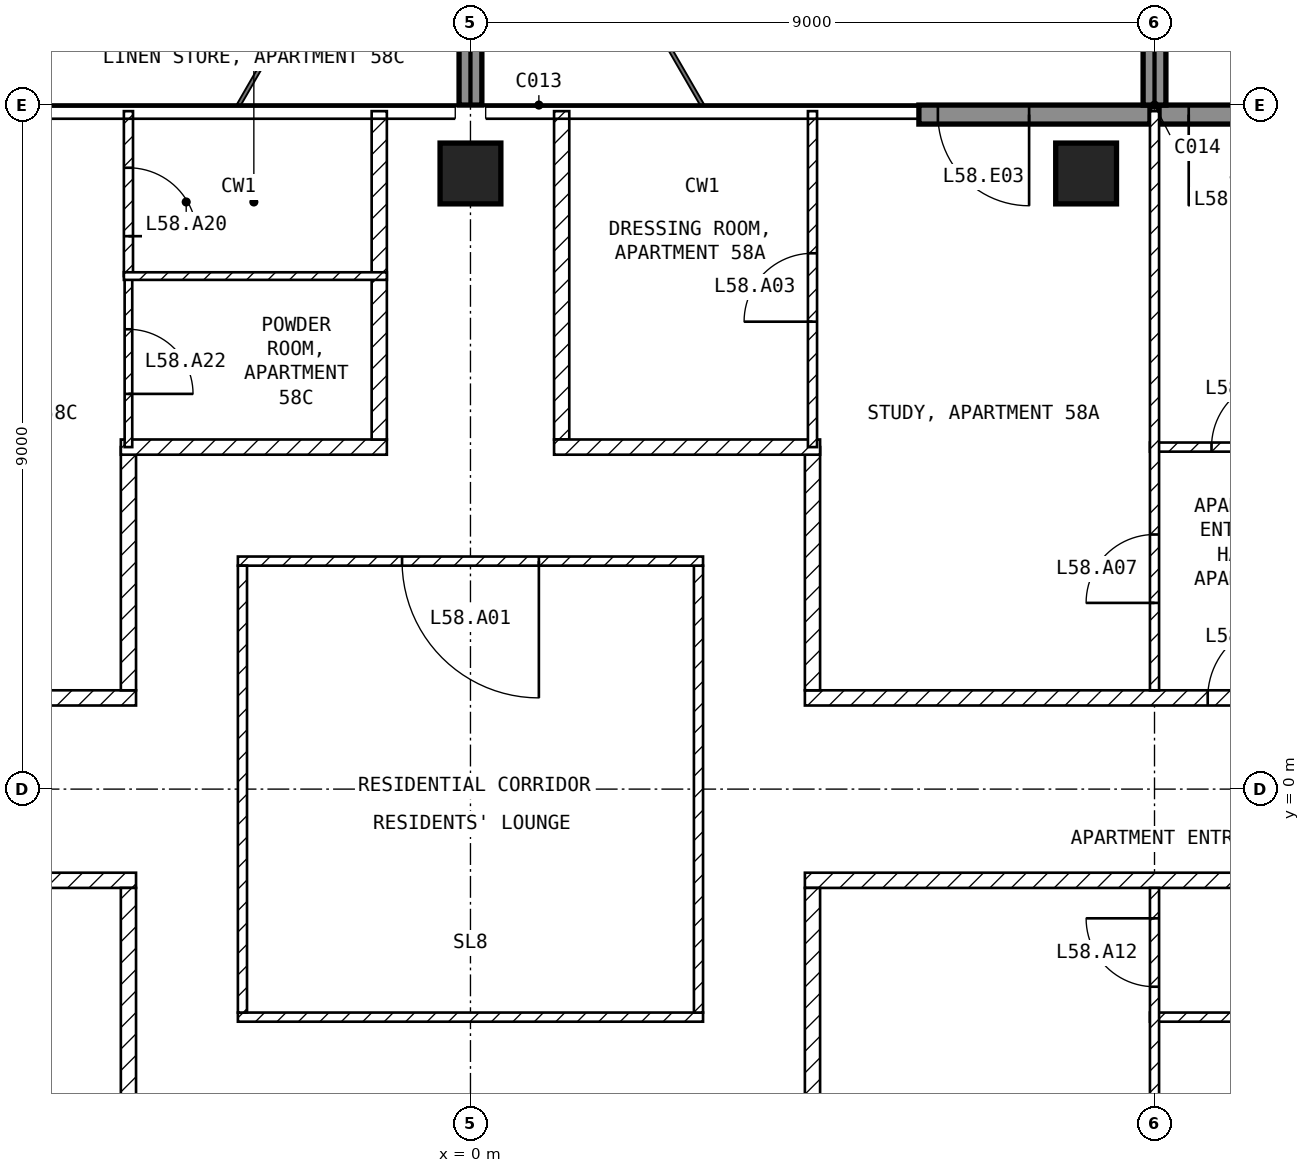
"""IFC4 building model, lengths in metres.
Left out: names, types, materials, properties, quantities, classifications, styles, units other than length and angle.
Written with IfcOpenShell. Run it as: python <this file> out.ifc"""

import sys

from ifc_helpers import new_model, si_unit, direction, frame, frame_2d, origin, origin_2d, place, context, subcontext, project, spatial, rectangle, extrude, element, fill, save


model = new_model("IFC4")
c1 = context("Model", 3, precision=1e-05, world=origin(), true_north=direction((0.0, 1.0)))
c2 = subcontext(c1, "Body", "Model", "MODEL_VIEW")
j1 = project(units=[si_unit("LENGTHUNIT", "METRE"), si_unit("PLANEANGLEUNIT", "RADIAN")], contexts=[c1])
p1 = place(None, origin())
s1 = spatial("IfcSite", under=j1, at=p1, CompositionType="ELEMENT")
p2 = place(p1, origin())
s2 = spatial("IfcBuilding", under=s1, at=p2, CompositionType="ELEMENT")
p3 = place(p2, frame((0.0, 0.0, 232.5)))
s3 = spatial("IfcBuildingStorey", under=s2, at=p3, CompositionType="ELEMENT", Elevation=232.5)
for number, where, z_axis, x_axis in (
    (1, (0.0, 8.1, -0.25), (0.0, 0.0, 1.0), (1.0, 0.0, 0.0)),
    (2, (8.1, 8.1, -0.25), (0.0, 0.0, 1.0), (1.0, 0.0, 0.0)),
):
    element("IfcColumn", number, at=place(p3, frame(where, z_axis=z_axis, x_axis=x_axis)), inside=s3, PredefinedType="COLUMN", context=c2, shape_type="SweptSolid", body=[
        extrude(rectangle(XDim=0.8, YDim=0.8, at=origin_2d()), origin(), (0.0, 0.0, 1.0), 3.5),
    ])
p4 = place(p3, frame((10.9, 8.875, 0.0), z_axis=(0.0, 0.0, 1.0), x_axis=(-1.0, 0.0, 0.0)))
e3 = element("IfcWall", 3, at=p4, inside=s3, PredefinedType="SOLIDWALL", context=c2, shape_type="SweptSolid", body=[
    extrude(rectangle(XDim=1.84, YDim=0.25, at=frame_2d((0.92, 0.0))), origin(), (0.0, 0.0, 1.0), 3.25),
])
p5 = place(p4, frame((0.25, 0.0, 0.0)))
e4 = element("IfcOpeningElement", 4, at=p5, cuts=e3, PredefinedType="OPENING", context=c2, shape_type="SweptSolid", body=[
    extrude(rectangle(XDim=1.2, YDim=2.4, at=frame_2d((0.6, 1.2))), frame((0.0, 0.135, 0.0), z_axis=(0.0, -1.0, 0.0), x_axis=(1.0, 0.0, 0.0)), (0.0, 0.0, 1.0), 0.27),
])
p6 = place(p3, frame((8.94, 8.875, 0.0), z_axis=(0.0, 0.0, 1.0), x_axis=(-1.0, 0.0, 0.0)))
e5 = element("IfcWall", 5, at=p6, inside=s3, PredefinedType="SOLIDWALL", context=c2, shape_type="SweptSolid", body=[
    extrude(rectangle(XDim=3.04, YDim=0.25, at=frame_2d((1.52, 0.0))), origin(), (0.0, 0.0, 1.0), 3.25),
])
p7 = place(p6, frame((1.59, 0.0, 0.0)))
e6 = element("IfcOpeningElement", 6, at=p7, cuts=e5, PredefinedType="OPENING", context=c2, shape_type="SweptSolid", body=[
    extrude(rectangle(XDim=1.2, YDim=2.4, at=frame_2d((0.6, 1.2))), frame((0.0, 0.135, 0.0), z_axis=(0.0, -1.0, 0.0), x_axis=(1.0, 0.0, 0.0)), (0.0, 0.0, 1.0), 0.27),
])
for number, where, z_axis, x_axis in (
    (7, (0.0, 9.0, 0.0), (0.0, 0.0, 1.0), (0.0, 1.0, 0.0)),
    (8, (9.0, 9.0, 0.0), (0.0, 0.0, 1.0), (0.0, 1.0, 0.0)),
):
    element("IfcWall", number, at=place(p3, frame(where, z_axis=z_axis, x_axis=x_axis)), inside=s3, PredefinedType="SOLIDWALL", context=c2, shape_type="SweptSolid", body=[
        extrude(rectangle(XDim=2.7, YDim=0.3, at=frame_2d((1.35, 0.0))), origin(), (0.0, 0.0, 1.0), 3.25),
    ])
p8 = place(p3, frame((-3.06, -3.0, 0.0), z_axis=(0.0, 0.0, 1.0), x_axis=(1.0, 0.0, 0.0)))
e9 = element("IfcWall", 9, at=p8, inside=s3, PredefinedType="PARTITIONING", context=c2, shape_type="SweptSolid", body=[
    extrude(rectangle(XDim=6.12, YDim=0.12, at=frame_2d((3.06, 0.0))), origin(), (0.0, 0.0, 1.0), 3.25),
])
p9 = place(p3, frame((3.0, -2.94, 0.0), z_axis=(0.0, 0.0, 1.0), x_axis=(0.0, 1.0, 0.0)))
e10 = element("IfcWall", 10, at=p9, inside=s3, PredefinedType="PARTITIONING", context=c2, shape_type="SweptSolid", body=[
    extrude(rectangle(XDim=5.88, YDim=0.12, at=frame_2d((2.94, 0.0))), origin(), (0.0, 0.0, 1.0), 3.25),
])
p10 = place(p3, frame((3.06, 3.0, 0.0), z_axis=(0.0, 0.0, 1.0), x_axis=(-1.0, 0.0, 0.0)))
e11 = element("IfcWall", 11, at=p10, inside=s3, PredefinedType="PARTITIONING", context=c2, shape_type="SweptSolid", body=[
    extrude(rectangle(XDim=6.12, YDim=0.12, at=frame_2d((3.06, 0.0))), origin(), (0.0, 0.0, 1.0), 3.25),
])
p11 = place(p10, frame((2.16, 0.0, 0.0)))
e12 = element("IfcOpeningElement", 12, at=p11, cuts=e11, PredefinedType="OPENING", context=c2, shape_type="SweptSolid", body=[
    extrude(rectangle(XDim=1.8, YDim=2.1, at=frame_2d((0.9, 1.05))), frame((0.0, 0.07, 0.0), z_axis=(0.0, -1.0, 0.0), x_axis=(1.0, 0.0, 0.0)), (0.0, 0.0, 1.0), 0.14),
])
p12 = place(p3, frame((-3.0, 2.94, 0.0), z_axis=(0.0, 0.0, 1.0), x_axis=(0.0, -1.0, 0.0)))
e13 = element("IfcWall", 13, at=p12, inside=s3, PredefinedType="PARTITIONING", context=c2, shape_type="SweptSolid", body=[
    extrude(rectangle(XDim=5.88, YDim=0.12, at=frame_2d((2.94, 0.0))), origin(), (0.0, 0.0, 1.0), 3.25),
])
p13 = place(p3, frame((4.4, 1.2, 0.0), z_axis=(0.0, 0.0, 1.0), x_axis=(1.0, 0.0, 0.0)))
e14 = element("IfcWall", 14, at=p13, inside=s3, PredefinedType="PARTITIONING", context=c2, shape_type="SweptSolid", body=[
    extrude(rectangle(XDim=17.2, YDim=0.2, at=frame_2d((8.6, 0.0))), origin(), (0.0, 0.0, 1.0), 3.25),
])
p14 = place(p13, frame((5.3, 0.0, 0.0)))
e15 = element("IfcOpeningElement", 15, at=p14, cuts=e14, PredefinedType="OPENING", context=c2, shape_type="SweptSolid", body=[
    extrude(rectangle(XDim=1.0, YDim=2.1, at=frame_2d((0.5, 1.05))), frame((0.0, 0.11, 0.0), z_axis=(0.0, -1.0, 0.0), x_axis=(1.0, 0.0, 0.0)), (0.0, 0.0, 1.0), 0.22),
])
p15 = place(p3, frame((4.5, 4.5, 0.0), z_axis=(0.0, 0.0, 1.0), x_axis=(0.0, -1.0, 0.0)))
e16 = element("IfcWall", 16, at=p15, inside=s3, PredefinedType="PARTITIONING", context=c2, shape_type="SweptSolid", body=[
    extrude(rectangle(XDim=3.2, YDim=0.2, at=frame_2d((1.6, 0.0))), origin(), (0.0, 0.0, 1.0), 3.25),
])
p16 = place(p3, frame((1.2, 8.92, 0.0), z_axis=(0.0, 0.0, 1.0), x_axis=(0.0, -1.0, 0.0)))
e17 = element("IfcWall", 17, at=p16, inside=s3, PredefinedType="PARTITIONING", context=c2, shape_type="SweptSolid", body=[
    extrude(rectangle(XDim=4.32, YDim=0.2, at=frame_2d((2.16, 0.0))), origin(), (0.0, 0.0, 1.0), 3.25),
])
p17 = place(p3, frame((1.1, 4.5, 0.0), z_axis=(0.0, 0.0, 1.0), x_axis=(1.0, 0.0, 0.0)))
e18 = element("IfcWall", 18, at=p17, inside=s3, PredefinedType="PARTITIONING", context=c2, shape_type="SweptSolid", body=[
    extrude(rectangle(XDim=3.5, YDim=0.2, at=frame_2d((1.75, 0.0))), origin(), (0.0, 0.0, 1.0), 3.25),
])
p18 = place(p3, frame((21.6, -1.2, 0.0), z_axis=(0.0, 0.0, 1.0), x_axis=(-1.0, 0.0, 0.0)))
e19 = element("IfcWall", 19, at=p18, inside=s3, PredefinedType="PARTITIONING", context=c2, shape_type="SweptSolid", body=[
    extrude(rectangle(XDim=17.2, YDim=0.2, at=frame_2d((8.6, 0.0))), origin(), (0.0, 0.0, 1.0), 3.25),
])
p19 = place(p18, frame((10.3, 0.0, 0.0)))
e20 = element("IfcOpeningElement", 20, at=p19, cuts=e19, PredefinedType="OPENING", context=c2, shape_type="SweptSolid", body=[
    extrude(rectangle(XDim=1.0, YDim=2.1, at=frame_2d((0.5, 1.05))), frame((0.0, 0.11, 0.0), z_axis=(0.0, -1.0, 0.0), x_axis=(1.0, 0.0, 0.0)), (0.0, 0.0, 1.0), 0.22),
])
p20 = place(p3, frame((4.5, -1.3, 0.0), z_axis=(0.0, 0.0, 1.0), x_axis=(0.0, -1.0, 0.0)))
e21 = element("IfcWall", 21, at=p20, inside=s3, PredefinedType="PARTITIONING", context=c2, shape_type="SweptSolid", body=[
    extrude(rectangle(XDim=3.2, YDim=0.2, at=frame_2d((1.6, 0.0))), origin(), (0.0, 0.0, 1.0), 3.25),
])
p21 = place(p3, frame((-21.6, 1.2, 0.0), z_axis=(0.0, 0.0, 1.0), x_axis=(1.0, 0.0, 0.0)))
e22 = element("IfcWall", 22, at=p21, inside=s3, PredefinedType="PARTITIONING", context=c2, shape_type="SweptSolid", body=[
    extrude(rectangle(XDim=17.2, YDim=0.2, at=frame_2d((8.6, 0.0))), origin(), (0.0, 0.0, 1.0), 3.25),
])
p22 = place(p21, frame((6.1, 0.0, 0.0)))
e23 = element("IfcOpeningElement", 23, at=p22, cuts=e22, PredefinedType="OPENING", context=c2, shape_type="SweptSolid", body=[
    extrude(rectangle(XDim=1.0, YDim=2.1, at=frame_2d((0.5, 1.05))), frame((0.0, 0.11, 0.0), z_axis=(0.0, -1.0, 0.0), x_axis=(1.0, 0.0, 0.0)), (0.0, 0.0, 1.0), 0.22),
])
p23 = place(p3, frame((-4.5, 1.3, 0.0), z_axis=(0.0, 0.0, 1.0), x_axis=(0.0, 1.0, 0.0)))
e24 = element("IfcWall", 24, at=p23, inside=s3, PredefinedType="PARTITIONING", context=c2, shape_type="SweptSolid", body=[
    extrude(rectangle(XDim=3.2, YDim=0.2, at=frame_2d((1.6, 0.0))), origin(), (0.0, 0.0, 1.0), 3.25),
])
p24 = place(p3, frame((-4.6, 4.5, 0.0), z_axis=(0.0, 0.0, 1.0), x_axis=(1.0, 0.0, 0.0)))
e25 = element("IfcWall", 25, at=p24, inside=s3, PredefinedType="PARTITIONING", context=c2, shape_type="SweptSolid", body=[
    extrude(rectangle(XDim=3.5, YDim=0.2, at=frame_2d((1.75, 0.0))), origin(), (0.0, 0.0, 1.0), 3.25),
])
p25 = place(p3, frame((-1.2, 4.6, 0.0), z_axis=(0.0, 0.0, 1.0), x_axis=(0.0, 1.0, 0.0)))
e26 = element("IfcWall", 26, at=p25, inside=s3, PredefinedType="PARTITIONING", context=c2, shape_type="SweptSolid", body=[
    extrude(rectangle(XDim=4.32, YDim=0.2, at=frame_2d((2.16, 0.0))), origin(), (0.0, 0.0, 1.0), 3.25),
])
p26 = place(p3, frame((-4.4, -1.2, 0.0), z_axis=(0.0, 0.0, 1.0), x_axis=(-1.0, 0.0, 0.0)))
e27 = element("IfcWall", 27, at=p26, inside=s3, PredefinedType="PARTITIONING", context=c2, shape_type="SweptSolid", body=[
    extrude(rectangle(XDim=17.2, YDim=0.2, at=frame_2d((8.6, 0.0))), origin(), (0.0, 0.0, 1.0), 3.25),
])
p27 = place(p26, frame((5.9, 0.0, 0.0)))
e28 = element("IfcOpeningElement", 28, at=p27, cuts=e27, PredefinedType="OPENING", context=c2, shape_type="SweptSolid", body=[
    extrude(rectangle(XDim=1.0, YDim=2.1, at=frame_2d((0.5, 1.05))), frame((0.0, 0.11, 0.0), z_axis=(0.0, -1.0, 0.0), x_axis=(1.0, 0.0, 0.0)), (0.0, 0.0, 1.0), 0.22),
])
p28 = place(p3, frame((-4.5, -4.5, 0.0), z_axis=(0.0, 0.0, 1.0), x_axis=(0.0, 1.0, 0.0)))
e29 = element("IfcWall", 29, at=p28, inside=s3, PredefinedType="PARTITIONING", context=c2, shape_type="SweptSolid", body=[
    extrude(rectangle(XDim=3.2, YDim=0.2, at=frame_2d((1.6, 0.0))), origin(), (0.0, 0.0, 1.0), 3.25),
])
p29 = place(p3, frame((8.94, 4.5, 0.0), z_axis=(0.0, 0.0, 1.0), x_axis=(1.0, 0.0, 0.0)))
e30 = element("IfcWall", 30, at=p29, inside=s3, PredefinedType="PARTITIONING", context=c2, shape_type="SweptSolid", body=[
    extrude(rectangle(XDim=5.46, YDim=0.12, at=frame_2d((2.73, 0.0))), origin(), (0.0, 0.0, 1.0), 3.25),
])
p30 = place(p29, frame((0.81, 0.0, 0.0)))
e31 = element("IfcOpeningElement", 31, at=p30, cuts=e30, PredefinedType="OPENING", context=c2, shape_type="SweptSolid", body=[
    extrude(rectangle(XDim=0.9, YDim=2.1, at=frame_2d((0.45, 1.05))), frame((0.0, 0.07, 0.0), z_axis=(0.0, -1.0, 0.0), x_axis=(1.0, 0.0, 0.0)), (0.0, 0.0, 1.0), 0.14),
])
p31 = place(p3, frame((9.0, 1.3, 0.0), z_axis=(0.0, 0.0, 1.0), x_axis=(0.0, 1.0, 0.0)))
e32 = element("IfcWall", 32, at=p31, inside=s3, PredefinedType="PARTITIONING", context=c2, shape_type="SweptSolid", body=[
    extrude(rectangle(XDim=7.62, YDim=0.12, at=frame_2d((3.81, 0.0))), origin(), (0.0, 0.0, 1.0), 3.25),
])
p32 = place(p31, frame((1.15, 0.0, 0.0)))
e33 = element("IfcOpeningElement", 33, at=p32, cuts=e32, PredefinedType="OPENING", context=c2, shape_type="SweptSolid", body=[
    extrude(rectangle(XDim=0.9, YDim=2.1, at=frame_2d((0.45, 1.05))), frame((0.0, 0.07, 0.0), z_axis=(0.0, -1.0, 0.0), x_axis=(1.0, 0.0, 0.0)), (0.0, 0.0, 1.0), 0.14),
])
p33 = place(p3, frame((4.5, 4.5, 0.0), z_axis=(0.0, 0.0, 1.0), x_axis=(0.0, 1.0, 0.0)))
e34 = element("IfcWall", 34, at=p33, inside=s3, PredefinedType="PARTITIONING", context=c2, shape_type="SweptSolid", body=[
    extrude(rectangle(XDim=4.42, YDim=0.12, at=frame_2d((2.21, 0.0))), origin(), (0.0, 0.0, 1.0), 3.25),
])
p34 = place(p33, frame((1.65, 0.0, 0.0)))
e35 = element("IfcOpeningElement", 35, at=p34, cuts=e34, PredefinedType="OPENING", context=c2, shape_type="SweptSolid", body=[
    extrude(rectangle(XDim=0.9, YDim=2.1, at=frame_2d((0.45, 1.05))), frame((0.0, 0.07, 0.0), z_axis=(0.0, -1.0, 0.0), x_axis=(1.0, 0.0, 0.0)), (0.0, 0.0, 1.0), 0.14),
])
p35 = place(p3, frame((17.4, -3.0, 0.0), z_axis=(0.0, 0.0, 1.0), x_axis=(-1.0, 0.0, 0.0)))
e36 = element("IfcWall", 36, at=p35, inside=s3, PredefinedType="PARTITIONING", context=c2, shape_type="SweptSolid", body=[
    extrude(rectangle(XDim=8.46, YDim=0.12, at=frame_2d((4.23, 0.0))), origin(), (0.0, 0.0, 1.0), 3.25),
])
p36 = place(p35, frame((0.45, 0.0, 0.0)))
e37 = element("IfcOpeningElement", 37, at=p36, cuts=e36, PredefinedType="OPENING", context=c2, shape_type="SweptSolid", body=[
    extrude(rectangle(XDim=0.9, YDim=2.1, at=frame_2d((0.45, 1.05))), frame((0.0, 0.07, 0.0), z_axis=(0.0, -1.0, 0.0), x_axis=(1.0, 0.0, 0.0)), (0.0, 0.0, 1.0), 0.14),
])
p37 = place(p35, frame((6.15, 0.0, 0.0)))
e38 = element("IfcOpeningElement", 38, at=p37, cuts=e36, PredefinedType="OPENING", context=c2, shape_type="SweptSolid", body=[
    extrude(rectangle(XDim=0.9, YDim=2.1, at=frame_2d((0.45, 1.05))), frame((0.0, 0.07, 0.0), z_axis=(0.0, -1.0, 0.0), x_axis=(1.0, 0.0, 0.0)), (0.0, 0.0, 1.0), 0.14),
])
p38 = place(p3, frame((9.0, -8.92, 0.0), z_axis=(0.0, 0.0, 1.0), x_axis=(0.0, 1.0, 0.0)))
e39 = element("IfcWall", 39, at=p38, inside=s3, PredefinedType="PARTITIONING", context=c2, shape_type="SweptSolid", body=[
    extrude(rectangle(XDim=7.62, YDim=0.12, at=frame_2d((3.81, 0.0))), origin(), (0.0, 0.0, 1.0), 3.25),
])
p39 = place(p38, frame((6.32, 0.0, 0.0)))
e40 = element("IfcOpeningElement", 40, at=p39, cuts=e39, PredefinedType="OPENING", context=c2, shape_type="SweptSolid", body=[
    extrude(rectangle(XDim=0.9, YDim=2.1, at=frame_2d((0.45, 1.05))), frame((0.0, 0.07, 0.0), z_axis=(0.0, -1.0, 0.0), x_axis=(1.0, 0.0, 0.0)), (0.0, 0.0, 1.0), 0.14),
])
p40 = place(p3, frame((-4.5, 6.75, 0.0), z_axis=(0.0, 0.0, 1.0), x_axis=(0.0, -1.0, 0.0)))
e41 = element("IfcWall", 41, at=p40, inside=s3, PredefinedType="PARTITIONING", context=c2, shape_type="SweptSolid", body=[
    extrude(rectangle(XDim=2.25, YDim=0.1, at=frame_2d((1.125, 0.0))), origin(), (0.0, 0.0, 1.0), 3.25),
])
p41 = place(p40, frame((0.7, 0.0, 0.0)))
e42 = element("IfcOpeningElement", 42, at=p41, cuts=e41, PredefinedType="OPENING", context=c2, shape_type="SweptSolid", body=[
    extrude(rectangle(XDim=0.85, YDim=2.1, at=frame_2d((0.425, 1.05))), frame((0.0, 0.06, 0.0), z_axis=(0.0, -1.0, 0.0), x_axis=(1.0, 0.0, 0.0)), (0.0, 0.0, 1.0), 0.12),
])
p42 = place(p3, frame((-4.5, 8.92, 0.0), z_axis=(0.0, 0.0, 1.0), x_axis=(0.0, -1.0, 0.0)))
e43 = element("IfcWall", 43, at=p42, inside=s3, PredefinedType="PARTITIONING", context=c2, shape_type="SweptSolid", body=[
    extrude(rectangle(XDim=2.17, YDim=0.12, at=frame_2d((1.085, 0.0))), origin(), (0.0, 0.0, 1.0), 3.25),
])
p43 = place(p42, frame((0.745, 0.0, 0.0)))
e44 = element("IfcOpeningElement", 44, at=p43, cuts=e43, PredefinedType="OPENING", context=c2, shape_type="SweptSolid", body=[
    extrude(rectangle(XDim=0.9, YDim=2.1, at=frame_2d((0.45, 1.05))), frame((0.0, 0.07, 0.0), z_axis=(0.0, -1.0, 0.0), x_axis=(1.0, 0.0, 0.0)), (0.0, 0.0, 1.0), 0.14),
])
p44 = place(p3, frame((-4.56, 6.75, 0.0), z_axis=(0.0, 0.0, 1.0), x_axis=(1.0, 0.0, 0.0)))
e45 = element("IfcWall", 45, at=p44, inside=s3, PredefinedType="PARTITIONING", context=c2, shape_type="SweptSolid", body=[
    extrude(rectangle(XDim=3.46, YDim=0.1, at=frame_2d((1.73, 0.0))), origin(), (0.0, 0.0, 1.0), 3.25),
])
p45 = place(p5, origin())
e46 = element("IfcDoor", 46, at=p45, inside=s3, OperationType="SINGLE_SWING_RIGHT", PredefinedType="DOOR", context=c2, shape_type="SweptSolid", body=[
    extrude(rectangle(XDim=1.2, YDim=2.4, at=frame_2d((0.6, 1.2))), frame((0.0, 0.025, 0.0), z_axis=(0.0, -1.0, 0.0), x_axis=(1.0, 0.0, 0.0)), (0.0, 0.0, 1.0), 0.05),
])
fill(e4, e46)
p46 = place(p7, origin())
e47 = element("IfcDoor", 47, at=p46, inside=s3, OperationType="SINGLE_SWING_LEFT", PredefinedType="DOOR", context=c2, shape_type="SweptSolid", body=[
    extrude(rectangle(XDim=1.2, YDim=2.4, at=frame_2d((0.6, 1.2))), frame((0.0, 0.025, 0.0), z_axis=(0.0, -1.0, 0.0), x_axis=(1.0, 0.0, 0.0)), (0.0, 0.0, 1.0), 0.05),
])
fill(e6, e47)
p47 = place(p11, origin())
e48 = element("IfcDoor", 48, at=p47, inside=s3, OperationType="SINGLE_SWING_LEFT", PredefinedType="DOOR", context=c2, shape_type="SweptSolid", body=[
    extrude(rectangle(XDim=1.8, YDim=2.1, at=frame_2d((0.9, 1.05))), frame((0.0, 0.025, 0.0), z_axis=(0.0, -1.0, 0.0), x_axis=(1.0, 0.0, 0.0)), (0.0, 0.0, 1.0), 0.05),
])
fill(e12, e48)
p48 = place(p34, origin())
e49 = element("IfcDoor", 49, at=p48, inside=s3, OperationType="SINGLE_SWING_LEFT", PredefinedType="DOOR", context=c2, shape_type="SweptSolid", body=[
    extrude(rectangle(XDim=0.9, YDim=2.1, at=frame_2d((0.45, 1.05))), frame((0.0, 0.025, 0.0), z_axis=(0.0, -1.0, 0.0), x_axis=(1.0, 0.0, 0.0)), (0.0, 0.0, 1.0), 0.05),
])
fill(e35, e49)
p49 = place(p30, origin())
e50 = element("IfcDoor", 50, at=p49, inside=s3, OperationType="SINGLE_SWING_RIGHT", PredefinedType="DOOR", context=c2, shape_type="SweptSolid", body=[
    extrude(rectangle(XDim=0.9, YDim=2.1, at=frame_2d((0.45, 1.05))), frame((0.0, 0.025, 0.0), z_axis=(0.0, -1.0, 0.0), x_axis=(1.0, 0.0, 0.0)), (0.0, 0.0, 1.0), 0.05),
])
fill(e31, e50)
p50 = place(p32, origin())
e51 = element("IfcDoor", 51, at=p50, inside=s3, OperationType="SINGLE_SWING_LEFT", PredefinedType="DOOR", context=c2, shape_type="SweptSolid", body=[
    extrude(rectangle(XDim=0.9, YDim=2.1, at=frame_2d((0.45, 1.05))), frame((0.0, 0.025, 0.0), z_axis=(0.0, -1.0, 0.0), x_axis=(1.0, 0.0, 0.0)), (0.0, 0.0, 1.0), 0.05),
])
fill(e33, e51)
p51 = place(p39, origin())
e52 = element("IfcDoor", 52, at=p51, inside=s3, OperationType="SINGLE_SWING_RIGHT", PredefinedType="DOOR", context=c2, shape_type="SweptSolid", body=[
    extrude(rectangle(XDim=0.9, YDim=2.1, at=frame_2d((0.45, 1.05))), frame((0.0, 0.025, 0.0), z_axis=(0.0, -1.0, 0.0), x_axis=(1.0, 0.0, 0.0)), (0.0, 0.0, 1.0), 0.05),
])
fill(e40, e52)
p52 = place(p43, origin())
e53 = element("IfcDoor", 53, at=p52, inside=s3, OperationType="SINGLE_SWING_RIGHT", PredefinedType="DOOR", context=c2, shape_type="SweptSolid", body=[
    extrude(rectangle(XDim=0.9, YDim=2.1, at=frame_2d((0.45, 1.05))), frame((0.0, 0.025, 0.0), z_axis=(0.0, -1.0, 0.0), x_axis=(1.0, 0.0, 0.0)), (0.0, 0.0, 1.0), 0.05),
])
fill(e44, e53)
p53 = place(p41, origin())
e54 = element("IfcDoor", 54, at=p53, inside=s3, OperationType="SINGLE_SWING_RIGHT", PredefinedType="DOOR", context=c2, shape_type="SweptSolid", body=[
    extrude(rectangle(XDim=0.85, YDim=2.1, at=frame_2d((0.425, 1.05))), frame((0.0, 0.025, 0.0), z_axis=(0.0, -1.0, 0.0), x_axis=(1.0, 0.0, 0.0)), (0.0, 0.0, 1.0), 0.05),
])
fill(e42, e54)
p54 = place(p14, origin())
e55 = element("IfcDoor", 55, at=p54, inside=s3, OperationType="SINGLE_SWING_RIGHT", PredefinedType="DOOR", context=c2, shape_type="SweptSolid", body=[
    extrude(rectangle(XDim=1.0, YDim=2.1, at=frame_2d((0.5, 1.05))), frame((0.0, 0.025, 0.0), z_axis=(0.0, -1.0, 0.0), x_axis=(1.0, 0.0, 0.0)), (0.0, 0.0, 1.0), 0.05),
])
fill(e15, e55)
save(model, sys.argv[1])
